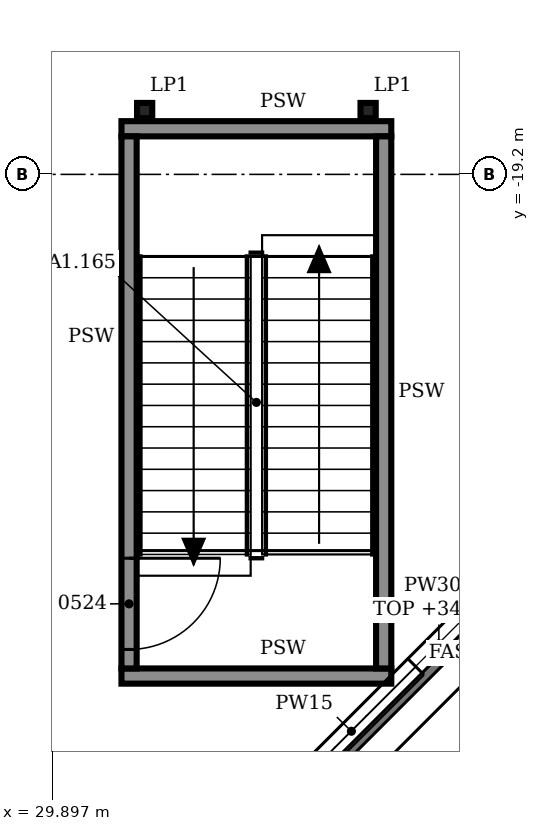
"""IFC4 building model, lengths in metres.
Left out: names, types, materials, properties, quantities, classifications, styles, units other than length and angle.
Written with IfcOpenShell. Run it as: python <this file> out.ifc"""

import sys

from ifc_helpers import new_model, si_unit, direction, frame, frame_2d, origin, origin_2d, place, context, subcontext, project, spatial, rectangle, i_section, extrude, element, fill, save


model = new_model("IFC4")
c1 = context("Model", 3, precision=1e-05, world=origin(), true_north=direction((0.0, 1.0)))
c2 = subcontext(c1, "Body", "Model", "MODEL_VIEW")
j1 = project(units=[si_unit("LENGTHUNIT", "METRE"), si_unit("PLANEANGLEUNIT", "RADIAN")], contexts=[c1])
p1 = place(None, origin())
s1 = spatial("IfcSite", under=j1, at=p1, CompositionType="ELEMENT")
p2 = place(p1, origin())
s2 = spatial("IfcBuilding", under=s1, at=p2, CompositionType="ELEMENT")
p3 = place(p2, frame((0.0, 0.0, 30.6)))
s3 = spatial("IfcBuildingStorey", under=s2, at=p3, CompositionType="ELEMENT", Elevation=30.6)
for number, where, z_axis, x_axis in (
    (1, (31.105, -18.36, 0.0), (0.0, 0.0, 1.0), (1.0, 0.0, 0.0)),
    (2, (34.045, -18.36, 0.0), (0.0, 0.0, 1.0), (1.0, 0.0, 0.0)),
):
    element("IfcColumn", number, at=place(p3, frame(where, z_axis=z_axis, x_axis=x_axis)), inside=s3, PredefinedType="COLUMN", context=c2, shape_type="SweptSolid", body=[
        extrude(i_section(OverallWidth=0.2, OverallDepth=0.2, WebThickness=0.009, FlangeThickness=0.015, FilletRadius=0.018, at=origin_2d()), origin(), (0.0, 0.0, 1.0), 2.2),
    ])
p4 = place(p3, frame((32.675, -27.677, 0.0), z_axis=(0.0, 0.0, 1.0), x_axis=(0.707088024292, 0.707125537583, 0.0)))
e3 = element("IfcWall", 3, at=p4, inside=s3, PredefinedType="SOLIDWALL", context=c2, shape_type="SweptSolid", body=[
    extrude(rectangle(XDim=6.508, YDim=0.3, at=frame_2d((3.254, 0.0))), origin(), (0.0, 0.0, 1.0), 4.0),
])
p5 = place(p4, frame((0.427, 0.0, 0.9)))
e4 = element("IfcOpeningElement", 4, at=p5, cuts=e3, PredefinedType="OPENING", context=c2, shape_type="SweptSolid", body=[
    extrude(rectangle(XDim=2.4, YDim=1.5, at=frame_2d((1.2, 0.75))), frame((0.0, 0.16, 0.0), z_axis=(0.0, -1.0, 0.0), x_axis=(1.0, 0.0, 0.0)), (0.0, 0.0, 1.0), 0.32),
])
p6 = place(p4, frame((3.681, 0.0, 0.9)))
e5 = element("IfcOpeningElement", 5, at=p6, cuts=e3, PredefinedType="OPENING", context=c2, shape_type="SweptSolid", body=[
    extrude(rectangle(XDim=2.4, YDim=1.5, at=frame_2d((1.2, 0.75))), frame((0.0, 0.16, 0.0), z_axis=(0.0, -1.0, 0.0), x_axis=(1.0, 0.0, 0.0)), (0.0, 0.0, 1.0), 0.32),
])
p7 = place(p3, frame((30.8, -25.8, 0.0), z_axis=(0.0, 0.0, 1.0), x_axis=(1.0, 0.0, 0.0)))
e6 = element("IfcWall", 6, at=p7, inside=s3, PredefinedType="SOLIDWALL", context=c2, shape_type="SweptSolid", body=[
    extrude(rectangle(XDim=3.55, YDim=0.2, at=frame_2d((1.775, 0.0))), origin(), (0.0, 0.0, 1.0), 4.6),
])
p8 = place(p3, frame((30.9, -25.7, 0.0), z_axis=(0.0, 0.0, 1.0), x_axis=(0.0, 1.0, 0.0)))
e7 = element("IfcWall", 7, at=p8, inside=s3, PredefinedType="SOLIDWALL", context=c2, shape_type="SweptSolid", body=[
    extrude(rectangle(XDim=7.0, YDim=0.2, at=frame_2d((3.5, 0.0))), origin(), (0.0, 0.0, 1.0), 4.6),
])
p9 = place(p8, frame((0.25, 0.0, 0.0)))
e8 = element("IfcOpeningElement", 8, at=p9, cuts=e7, PredefinedType="OPENING", context=c2, shape_type="SweptSolid", body=[
    extrude(rectangle(XDim=1.2, YDim=2.1, at=frame_2d((0.6, 1.05))), frame((0.0, 0.11, 0.0), z_axis=(0.0, -1.0, 0.0), x_axis=(1.0, 0.0, 0.0)), (0.0, 0.0, 1.0), 0.22),
])
p10 = place(p3, frame((34.25, -25.7, 0.0), z_axis=(0.0, 0.0, 1.0), x_axis=(0.0, 1.0, 0.0)))
e9 = element("IfcWall", 9, at=p10, inside=s3, PredefinedType="SOLIDWALL", context=c2, shape_type="SweptSolid", body=[
    extrude(rectangle(XDim=7.0, YDim=0.2, at=frame_2d((3.5, 0.0))), origin(), (0.0, 0.0, 1.0), 4.6),
])
p11 = place(p3, frame((30.8, -18.6, 0.0), z_axis=(0.0, 0.0, 1.0), x_axis=(1.0, 0.0, 0.0)))
e10 = element("IfcWall", 10, at=p11, inside=s3, PredefinedType="SOLIDWALL", context=c2, shape_type="SweptSolid", body=[
    extrude(rectangle(XDim=3.55, YDim=0.2, at=frame_2d((1.775, 0.0))), origin(), (0.0, 0.0, 1.0), 4.6),
])
p12 = place(p5, origin())
e11 = element("IfcWindow", 11, at=p12, inside=s3, PartitioningType="SINGLE_PANEL", PredefinedType="WINDOW", context=c2, shape_type="SweptSolid", body=[
    extrude(rectangle(XDim=2.4, YDim=1.5, at=frame_2d((1.2, 0.75))), frame((0.0, 0.03, 0.0), z_axis=(0.0, -1.0, 0.0), x_axis=(1.0, 0.0, 0.0)), (0.0, 0.0, 1.0), 0.06),
])
fill(e4, e11)
p13 = place(p9, frame((1.2, 0.0, 0.0), z_axis=(0.0, 0.0, 1.0), x_axis=(-1.0, 0.0, 0.0)))
e12 = element("IfcDoor", 12, at=p13, inside=s3, OperationType="SINGLE_SWING_LEFT", PredefinedType="DOOR", context=c2, shape_type="SweptSolid", body=[
    extrude(rectangle(XDim=1.2, YDim=2.1, at=frame_2d((0.6, 1.05))), frame((0.0, 0.025, 0.0), z_axis=(0.0, -1.0, 0.0), x_axis=(1.0, 0.0, 0.0)), (0.0, 0.0, 1.0), 0.05),
])
fill(e8, e12)
save(model, sys.argv[1])
